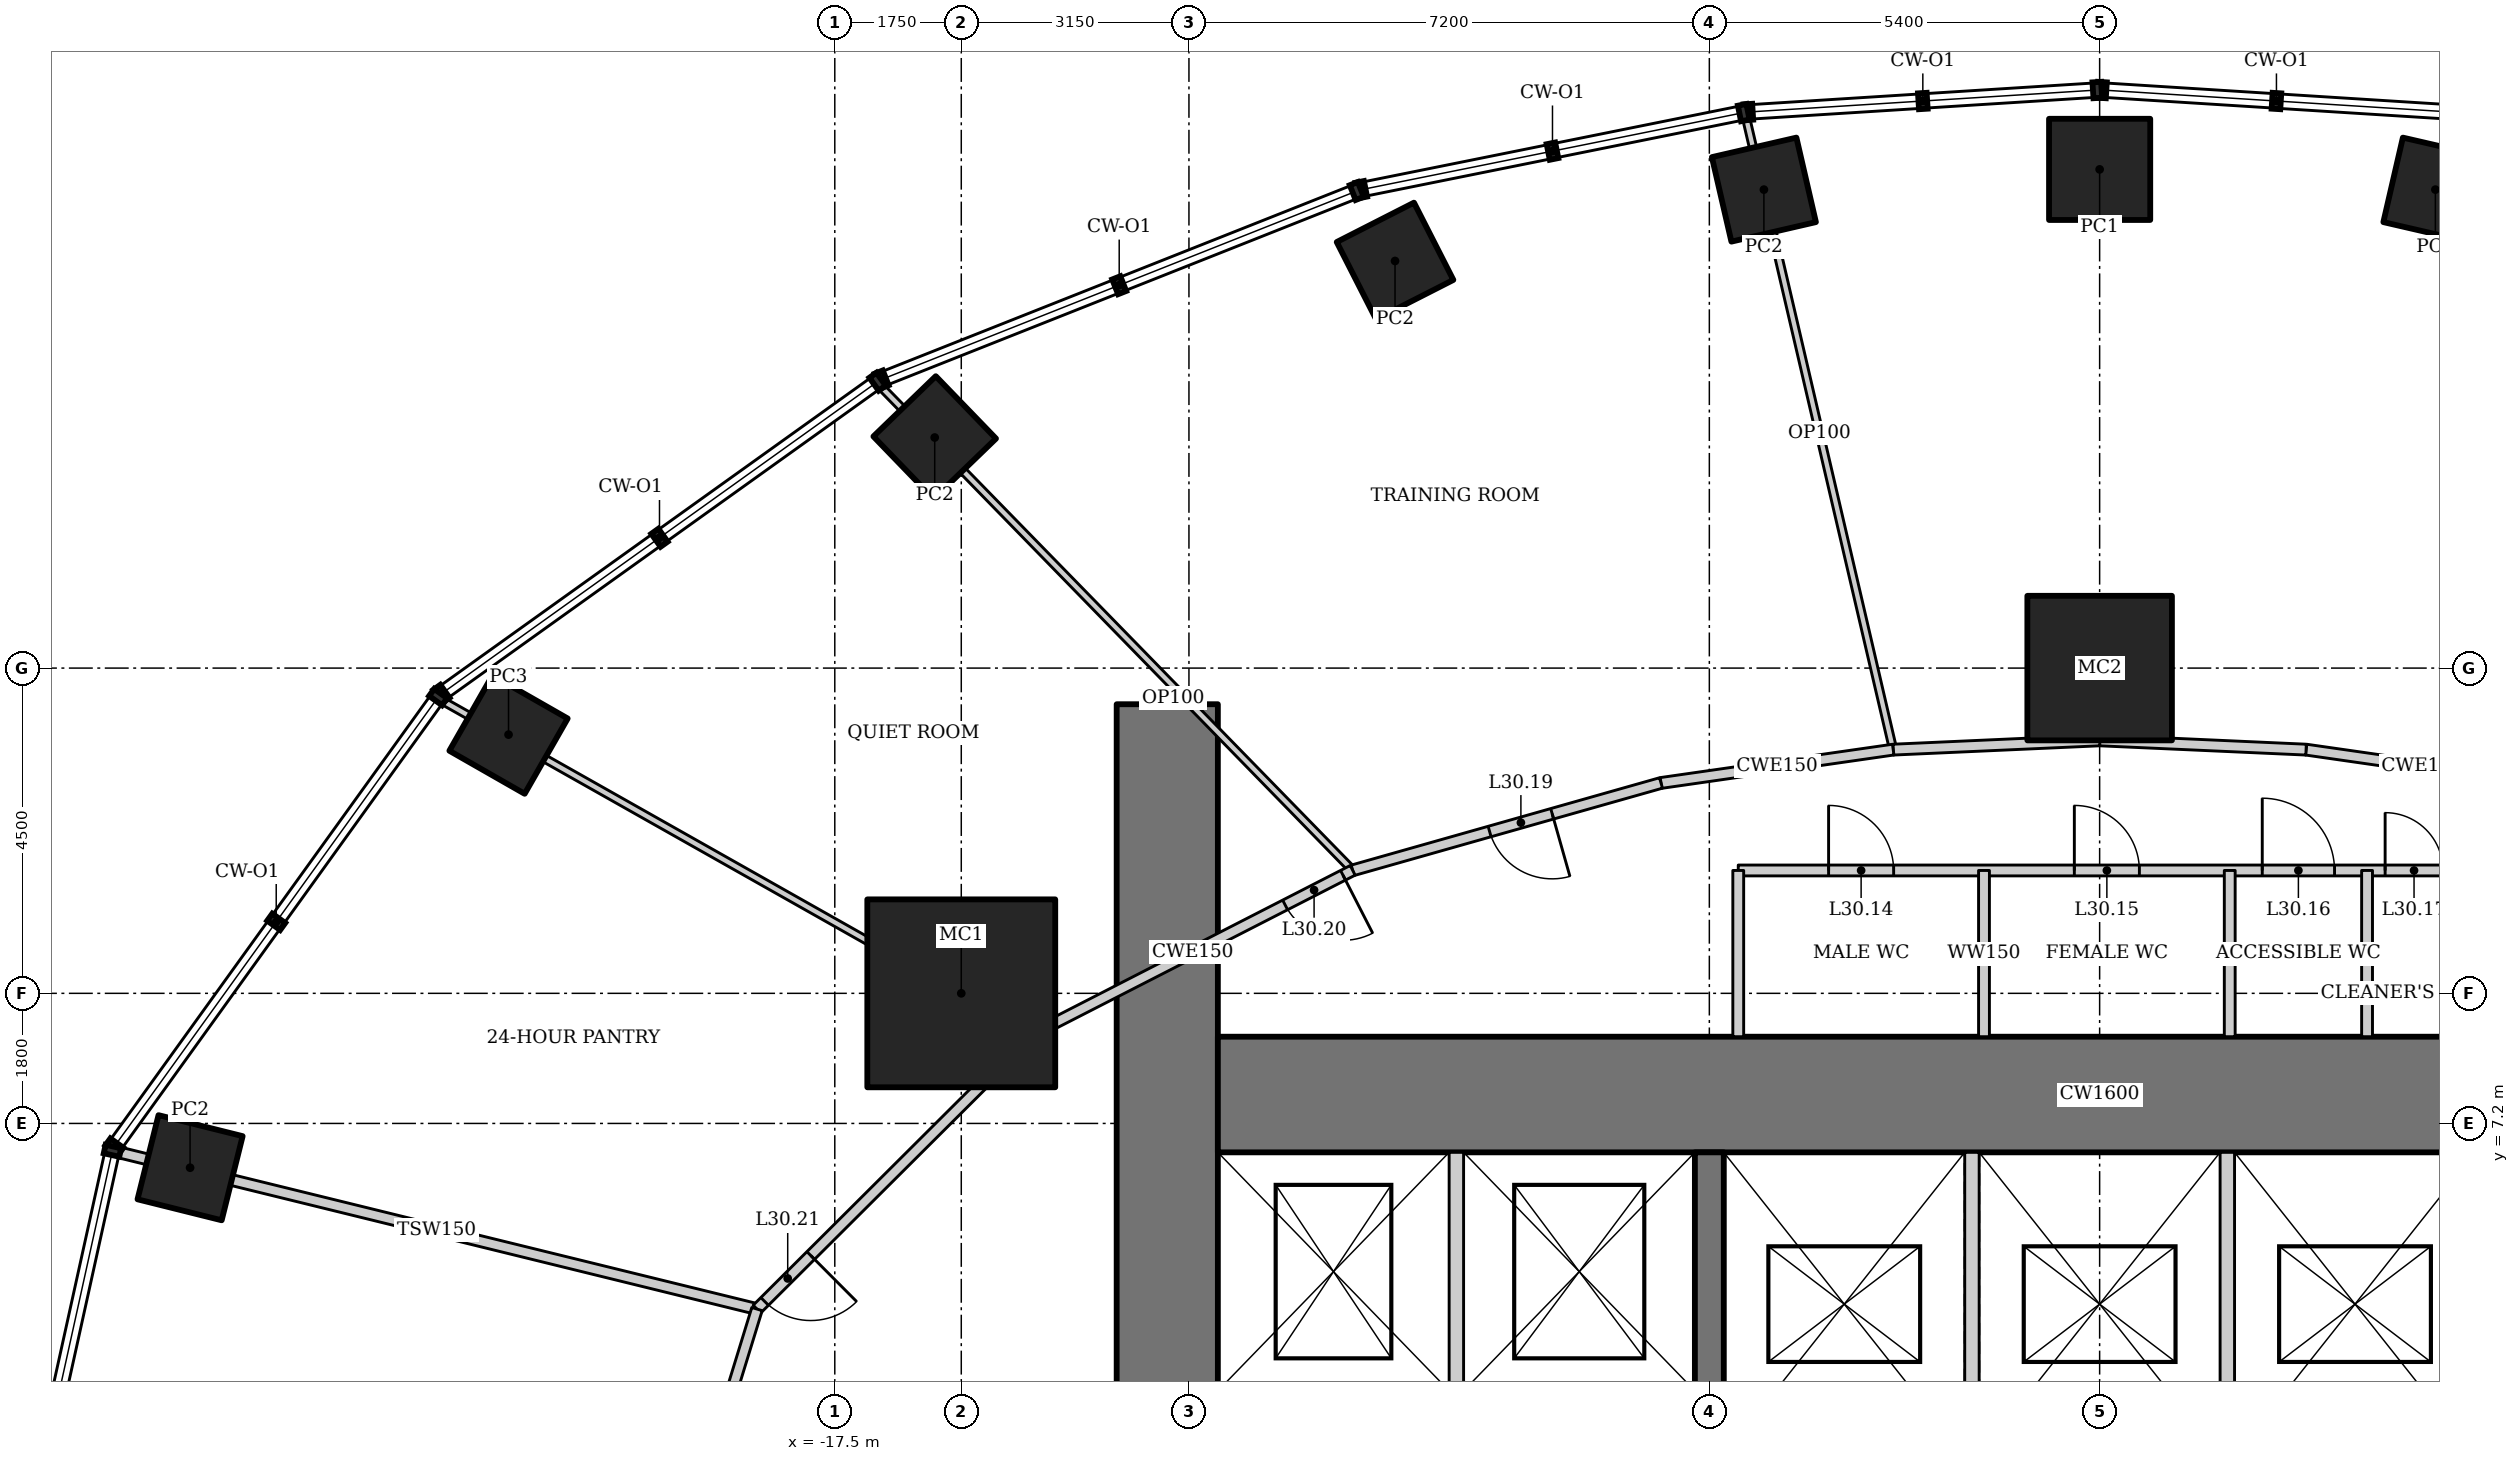
"""IFC4 building model, lengths in metres.
Left out: names, types, materials, properties, quantities, classifications, styles, units other than length and angle.
Written with IfcOpenShell. Run it as: python <this file> out.ifc"""

import sys

from ifc_helpers import new_model, si_unit, direction, frame, frame_2d, origin, origin_2d, place, context, subcontext, project, spatial, rectangle, hollow_rectangle, extrude, element, fill, save


model = new_model("IFC4")
c1 = context("Model", 3, precision=1e-05, world=origin(), true_north=direction((0.0, 1.0)))
c2 = subcontext(c1, "Body", "Model", "MODEL_VIEW")
j1 = project(units=[si_unit("LENGTHUNIT", "METRE"), si_unit("PLANEANGLEUNIT", "RADIAN")], contexts=[c1])
p1 = place(None, origin())
s1 = spatial("IfcSite", under=j1, at=p1, CompositionType="ELEMENT")
p2 = place(p1, origin())
s2 = spatial("IfcBuilding", under=s1, at=p2, CompositionType="ELEMENT")
p3 = place(p2, frame((0.0, 0.0, 130.0)))
s3 = spatial("IfcBuildingStorey", under=s2, at=p3, CompositionType="ELEMENT", Elevation=130.0)
p4 = place(p3, frame((0.0, 13.5, 0.0), z_axis=(0.0, 0.0, 1.0), x_axis=(1.0, 0.0, 0.0)))
e1 = element("IfcColumn", 1, at=p4, inside=s3, PredefinedType="COLUMN", context=c2, shape_type="SweptSolid", body=[
    extrude(hollow_rectangle(XDim=2.0, YDim=2.0, WallThickness=0.17, at=origin_2d()), origin(), (0.0, 0.0, 1.0), 4.2),
])
p5 = place(p3, frame((-15.75, 9.0, 0.0), z_axis=(0.0, 0.0, 1.0), x_axis=(1.0, 0.0, 0.0)))
e2 = element("IfcColumn", 2, at=p5, inside=s3, PredefinedType="COLUMN", context=c2, shape_type="SweptSolid", body=[
    extrude(hollow_rectangle(XDim=2.6, YDim=2.6, WallThickness=0.13, at=origin_2d()), origin(), (0.0, 0.0, 1.0), 4.2),
])
p6 = place(p3, frame((4.645, 20.12, 0.0), z_axis=(0.0, 0.0, 1.0), x_axis=(0.224951054344, 0.974370064785, 0.0)))
e3 = element("IfcColumn", 3, at=p6, inside=s3, PredefinedType="COLUMN", context=c2, shape_type="SweptSolid", body=[
    extrude(hollow_rectangle(XDim=1.2, YDim=1.2, WallThickness=0.1, at=origin_2d()), origin(), (0.0, 0.0, 1.0), 4.2),
])
p7 = place(p3, frame((0.0, 20.4, 0.0), z_axis=(0.0, 0.0, 1.0), x_axis=(1.0, 0.0, 0.0)))
e4 = element("IfcColumn", 4, at=p7, inside=s3, PredefinedType="COLUMN", context=c2, shape_type="SweptSolid", body=[
    extrude(hollow_rectangle(XDim=1.4, YDim=1.4, WallThickness=0.1, at=origin_2d()), origin(), (0.0, 0.0, 1.0), 4.2),
])
for number, where, z_axis, x_axis in (
    (5, (-4.645, 20.12, 0.0), (0.0, 0.0, 1.0), (0.974, 0.225, 0.0)),
    (6, (-9.749, 19.133, 0.0), (0.0, 0.0, 1.0), (0.891, 0.454, 0.0)),
    (7, (-16.118, 16.69, 0.0), (0.0, 0.0, 1.0), (0.719, 0.695, 0.0)),
):
    element("IfcColumn", number, at=place(p3, frame(where, z_axis=z_axis, x_axis=x_axis)), inside=s3, PredefinedType="COLUMN", context=c2, shape_type="SweptSolid", body=[
        extrude(hollow_rectangle(XDim=1.2, YDim=1.2, WallThickness=0.1, at=origin_2d()), origin(), (0.0, 0.0, 1.0), 4.2),
    ])
p8 = place(p3, frame((-22.014, 12.579, 0.0), z_axis=(0.0, 0.0, 1.0), x_axis=(0.496139221777, 0.86824298017, 0.0)))
e8 = element("IfcColumn", 8, at=p8, inside=s3, PredefinedType="COLUMN", context=c2, shape_type="SweptSolid", body=[
    extrude(hollow_rectangle(XDim=1.2, YDim=1.2, WallThickness=0.12, at=origin_2d()), origin(), (0.0, 0.0, 1.0), 4.2),
])
p9 = place(p3, frame((-26.42, 6.587, 0.0), z_axis=(0.0, 0.0, 1.0), x_axis=(0.2419218956, 0.970295726276, 0.0)))
e9 = element("IfcColumn", 9, at=p9, inside=s3, PredefinedType="COLUMN", context=c2, shape_type="SweptSolid", body=[
    extrude(hollow_rectangle(XDim=1.2, YDim=1.2, WallThickness=0.1, at=origin_2d()), origin(), (0.0, 0.0, 1.0), 4.2),
])
p10 = place(p3, frame((-12.9, 13.0, 0.0), z_axis=(0.0, 0.0, 1.0), x_axis=(0.0, -1.0, 0.0)))
e10 = element("IfcWall", 10, at=p10, inside=s3, PredefinedType="SHEAR", context=c2, shape_type="SweptSolid", body=[
    extrude(rectangle(XDim=26.0, YDim=1.4, at=frame_2d((13.0, 0.0))), origin(), (0.0, 0.0, 1.0), 4.2),
])
p11 = place(p10, frame((12.1, 0.0, 0.0)))
e11 = element("IfcOpeningElement", 11, at=p11, cuts=e10, PredefinedType="OPENING", context=c2, shape_type="SweptSolid", body=[
    extrude(rectangle(XDim=1.8, YDim=2.1, at=frame_2d((0.9, 1.05))), frame((0.0, 0.71, 0.0), z_axis=(0.0, -1.0, 0.0), x_axis=(1.0, 0.0, 0.0)), (0.0, 0.0, 1.0), 1.42),
])
p12 = place(p3, frame((12.2, 7.6, 0.0), z_axis=(0.0, 0.0, 1.0), x_axis=(-1.0, 0.0, 0.0)))
e12 = element("IfcWall", 12, at=p12, inside=s3, PredefinedType="SHEAR", context=c2, shape_type="SweptSolid", body=[
    extrude(rectangle(XDim=24.4, YDim=1.6, at=frame_2d((12.2, 0.0))), origin(), (0.0, 0.0, 1.0), 4.2),
])
p13 = place(p3, frame((-5.4, 6.8, 0.0), z_axis=(0.0, 0.0, 1.0), x_axis=(0.0, -1.0, 0.0)))
e13 = element("IfcWall", 13, at=p13, inside=s3, PredefinedType="SHEAR", context=c2, shape_type="SweptSolid", body=[
    extrude(rectangle(XDim=13.6, YDim=0.4, at=frame_2d((6.8, 0.0))), origin(), (0.0, 0.0, 1.0), 4.2),
])
p14 = place(p13, frame((5.9, 0.0, 0.0)))
e14 = element("IfcOpeningElement", 14, at=p14, cuts=e13, PredefinedType="OPENING", context=c2, shape_type="SweptSolid", body=[
    extrude(rectangle(XDim=1.8, YDim=2.1, at=frame_2d((0.9, 1.05))), frame((0.0, 0.21, 0.0), z_axis=(0.0, -1.0, 0.0), x_axis=(1.0, 0.0, 0.0)), (0.0, 0.0, 1.0), 0.42),
])
for number, where, z_axis, x_axis in (
    (15, (-1.767, 2.6, 0.0), (0.0, 0.0, 1.0), (0.0, 1.0, 0.0)),
    (16, (1.767, 2.6, 0.0), (0.0, 0.0, 1.0), (0.0, 1.0, 0.0)),
):
    element("IfcWall", number, at=place(p3, frame(where, z_axis=z_axis, x_axis=x_axis)), inside=s3, PredefinedType="SOLIDWALL", context=c2, shape_type="SweptSolid", body=[
        extrude(rectangle(XDim=4.2, YDim=0.2, at=frame_2d((2.1, 0.0))), origin(), (0.0, 0.0, 1.0), 4.2),
    ])
p15 = place(p3, frame((-8.9, 3.5, 0.0), z_axis=(0.0, 0.0, 1.0), x_axis=(0.0, 1.0, 0.0)))
e17 = element("IfcWall", 17, at=p15, inside=s3, PredefinedType="SOLIDWALL", context=c2, shape_type="SweptSolid", body=[
    extrude(rectangle(XDim=3.3, YDim=0.2, at=frame_2d((1.65, 0.0))), origin(), (0.0, 0.0, 1.0), 4.2),
])
p16 = place(p3, frame((-4.897, 21.135, 0.0), z_axis=(0.0, 0.0, 1.0), x_axis=(0.226817002645, -0.973937393938, 0.0)))
e18 = element("IfcWall", 18, at=p16, inside=s3, PredefinedType="PARTITIONING", context=c2, shape_type="SweptSolid", body=[
    extrude(rectangle(XDim=8.997, YDim=0.1, at=frame_2d((4.499, 0.0))), origin(), (0.0, 0.0, 1.0), 3.293),
])
p17 = place(p3, frame((-16.882, 17.414, 0.0), z_axis=(0.0, 0.0, 1.0), x_axis=(0.698290989425, -0.715814008027, 0.0)))
e19 = element("IfcWall", 19, at=p17, inside=s3, PredefinedType="PARTITIONING", context=c2, shape_type="SweptSolid", body=[
    extrude(rectangle(XDim=9.377, YDim=0.1, at=frame_2d((4.688, 0.0))), origin(), (0.0, 0.0, 1.0), 3.321),
])
p18 = place(p3, frame((-22.949, 13.059, 0.0), z_axis=(0.0, 0.0, 1.0), x_axis=(0.870733950517, -0.491754397456, 0.0)))
e20 = element("IfcWall", 20, at=p18, inside=s3, PredefinedType="PARTITIONING", context=c2, shape_type="SweptSolid", body=[
    extrude(rectangle(XDim=9.404, YDim=0.1, at=frame_2d((4.702, 0.0))), origin(), (0.0, 0.0, 1.0), 3.45),
])
p19 = place(p3, frame((-27.441, 6.809, 0.0), z_axis=(0.0, 0.0, 1.0), x_axis=(0.971128704348, -0.238556156056, 0.0)))
e21 = element("IfcWall", 21, at=p19, inside=s3, PredefinedType="PARTITIONING", context=c2, shape_type="SweptSolid", body=[
    extrude(rectangle(XDim=9.128, YDim=0.15, at=frame_2d((4.564, 0.0))), origin(), (0.0, 0.0, 1.0), 3.113),
])
p20 = place(p3, frame((6.069, 11.911, 0.0), z_axis=(0.0, 0.0, 1.0), x_axis=(-0.989852979412, 0.14209531713, 0.0)))
e22 = element("IfcWall", 22, at=p20, inside=s3, PredefinedType="PARTITIONING", context=c2, shape_type="SweptSolid", body=[
    extrude(rectangle(XDim=3.246, YDim=0.15, at=frame_2d((1.623, 0.0))), origin(), (0.0, 0.0, 1.0), 4.05),
])
for number, where, z_axis, x_axis in (
    (23, (2.856, 12.372, 0.0), (0.0, 0.0, 1.0), (-0.999, 0.045, 0.0)),
    (24, (0.0, 12.5, 0.0), (0.0, 0.0, 1.0), (-0.999, -0.045, 0.0)),
):
    element("IfcWall", number, at=place(p3, frame(where, z_axis=z_axis, x_axis=x_axis)), inside=s3, PredefinedType="PARTITIONING", context=c2, shape_type="SweptSolid", body=[
        extrude(rectangle(XDim=2.859, YDim=0.15, at=frame_2d((1.43, 0.0))), origin(), (0.0, 0.0, 1.0), 4.05),
    ])
p21 = place(p3, frame((-2.856, 12.372, 0.0), z_axis=(0.0, 0.0, 1.0), x_axis=(-0.989852979412, -0.14209531713, 0.0)))
e25 = element("IfcWall", 25, at=p21, inside=s3, PredefinedType="PARTITIONING", context=c2, shape_type="SweptSolid", body=[
    extrude(rectangle(XDim=3.246, YDim=0.15, at=frame_2d((1.623, 0.0))), origin(), (0.0, 0.0, 1.0), 4.05),
])
p22 = place(p3, frame((-6.069, 11.911, 0.0), z_axis=(0.0, 0.0, 1.0), x_axis=(-0.962122152905, -0.272618713388, 0.0)))
e26 = element("IfcWall", 26, at=p22, inside=s3, PredefinedType="PARTITIONING", context=c2, shape_type="SweptSolid", body=[
    extrude(rectangle(XDim=4.434, YDim=0.15, at=frame_2d((2.217, 0.0))), origin(), (0.0, 0.0, 1.0), 4.05),
])
p23 = place(p22, frame((1.565, 0.0, 0.0)))
e27 = element("IfcOpeningElement", 27, at=p23, cuts=e26, PredefinedType="OPENING", context=c2, shape_type="SweptSolid", body=[
    extrude(rectangle(XDim=0.9, YDim=2.1, at=frame_2d((0.45, 1.05))), frame((0.0, 0.085, 0.0), z_axis=(0.0, -1.0, 0.0), x_axis=(1.0, 0.0, 0.0)), (0.0, 0.0, 1.0), 0.17),
])
p24 = place(p3, frame((-10.335, 10.702, 0.0), z_axis=(0.0, 0.0, 1.0), x_axis=(-0.890004978294, -0.455950807227, 0.0)))
e28 = element("IfcWall", 28, at=p24, inside=s3, PredefinedType="PARTITIONING", context=c2, shape_type="SweptSolid", body=[
    extrude(rectangle(XDim=4.973, YDim=0.15, at=frame_2d((2.486, 0.0))), origin(), (0.0, 0.0, 1.0), 4.05),
])
p25 = place(p24, frame((0.15, 0.0, 0.0)))
e29 = element("IfcOpeningElement", 29, at=p25, cuts=e28, PredefinedType="OPENING", context=c2, shape_type="SweptSolid", body=[
    extrude(rectangle(XDim=0.9, YDim=2.1, at=frame_2d((0.45, 1.05))), frame((0.0, 0.085, 0.0), z_axis=(0.0, -1.0, 0.0), x_axis=(1.0, 0.0, 0.0)), (0.0, 0.0, 1.0), 0.17),
])
p26 = place(p3, frame((-14.76, 8.435, 0.0), z_axis=(0.0, 0.0, 1.0), x_axis=(-0.708306665233, -0.705904857603, 0.0)))
e30 = element("IfcWall", 30, at=p26, inside=s3, PredefinedType="PARTITIONING", context=c2, shape_type="SweptSolid", body=[
    extrude(rectangle(XDim=5.387, YDim=0.15, at=frame_2d((2.694, 0.0))), origin(), (0.0, 0.0, 1.0), 4.05),
])
p27 = place(p26, frame((4.337, 0.0, 0.0)))
e31 = element("IfcOpeningElement", 31, at=p27, cuts=e30, PredefinedType="OPENING", context=c2, shape_type="SweptSolid", body=[
    extrude(rectangle(XDim=0.9, YDim=2.1, at=frame_2d((0.45, 1.05))), frame((0.0, 0.085, 0.0), z_axis=(0.0, -1.0, 0.0), x_axis=(1.0, 0.0, 0.0)), (0.0, 0.0, 1.0), 0.17),
])
p28 = place(p3, frame((-18.576, 4.632, 0.0), z_axis=(0.0, 0.0, 1.0), x_axis=(-0.293799045613, -0.955867208767, 0.0)))
e32 = element("IfcWall", 32, at=p28, inside=s3, PredefinedType="PARTITIONING", context=c2, shape_type="SweptSolid", body=[
    extrude(rectangle(XDim=4.845, YDim=0.15, at=frame_2d((2.423, 0.0))), origin(), (0.0, 0.0, 1.0), 4.05),
])
p29 = place(p3, frame((-5.0, 10.7, 0.0), z_axis=(0.0, 0.0, 1.0), x_axis=(1.0, 0.0, 0.0)))
e33 = element("IfcWall", 33, at=p29, inside=s3, PredefinedType="SOLIDWALL", context=c2, shape_type="SweptSolid", body=[
    extrude(rectangle(XDim=10.0, YDim=0.15, at=frame_2d((5.0, 0.0))), origin(), (0.0, 0.0, 1.0), 4.05),
])
p30 = place(p29, frame((1.25, 0.0, 0.0)))
e34 = element("IfcOpeningElement", 34, at=p30, cuts=e33, PredefinedType="OPENING", context=c2, shape_type="SweptSolid", body=[
    extrude(rectangle(XDim=0.9, YDim=2.1, at=frame_2d((0.45, 1.05))), frame((0.0, 0.085, 0.0), z_axis=(0.0, -1.0, 0.0), x_axis=(1.0, 0.0, 0.0)), (0.0, 0.0, 1.0), 0.17),
])
p31 = place(p29, frame((4.65, 0.0, 0.0)))
e35 = element("IfcOpeningElement", 35, at=p31, cuts=e33, PredefinedType="OPENING", context=c2, shape_type="SweptSolid", body=[
    extrude(rectangle(XDim=0.9, YDim=2.1, at=frame_2d((0.45, 1.05))), frame((0.0, 0.085, 0.0), z_axis=(0.0, -1.0, 0.0), x_axis=(1.0, 0.0, 0.0)), (0.0, 0.0, 1.0), 0.17),
])
p32 = place(p29, frame((7.25, 0.0, 0.0)))
e36 = element("IfcOpeningElement", 36, at=p32, cuts=e33, PredefinedType="OPENING", context=c2, shape_type="SweptSolid", body=[
    extrude(rectangle(XDim=1.0, YDim=2.1, at=frame_2d((0.5, 1.05))), frame((0.0, 0.085, 0.0), z_axis=(0.0, -1.0, 0.0), x_axis=(1.0, 0.0, 0.0)), (0.0, 0.0, 1.0), 0.17),
])
p33 = place(p29, frame((8.95, 0.0, 0.0)))
e37 = element("IfcOpeningElement", 37, at=p33, cuts=e33, PredefinedType="OPENING", context=c2, shape_type="SweptSolid", body=[
    extrude(rectangle(XDim=0.8, YDim=2.1, at=frame_2d((0.4, 1.05))), frame((0.0, 0.085, 0.0), z_axis=(0.0, -1.0, 0.0), x_axis=(1.0, 0.0, 0.0)), (0.0, 0.0, 1.0), 0.17),
])
for number, where, z_axis, x_axis in (
    (38, (-5.0, 8.4, 0.0), (0.0, 0.0, 1.0), (0.0, 1.0, 0.0)),
    (39, (-1.6, 8.4, 0.0), (0.0, 0.0, 1.0), (0.0, 1.0, 0.0)),
    (40, (1.8, 8.4, 0.0), (0.0, 0.0, 1.0), (0.0, 1.0, 0.0)),
    (41, (3.7, 8.4, 0.0), (0.0, 0.0, 1.0), (0.0, 1.0, 0.0)),
):
    element("IfcWall", number, at=place(p3, frame(where, z_axis=z_axis, x_axis=x_axis)), inside=s3, PredefinedType="SOLIDWALL", context=c2, shape_type="SweptSolid", body=[
        extrude(rectangle(XDim=2.3, YDim=0.15, at=frame_2d((1.15, 0.0))), origin(), (0.0, 0.0, 1.0), 4.05),
    ])
p34 = place(p3, frame((-12.9, 13.0, 0.0), z_axis=(0.0, 0.0, 1.0), x_axis=(0.716013316663, 0.698086620959, 0.0)))
e42 = element("IfcWall", 42, at=p34, inside=s3, PredefinedType="PARTITIONING", context=c2, shape_type="SweptSolid", body=[
    extrude(rectangle(XDim=0.231, YDim=0.1, at=frame_2d((0.116, 0.0))), origin(), (0.0, 0.0, 1.0), 4.05),
])
p35 = place(p30, origin())
e43 = element("IfcDoor", 43, at=p35, inside=s3, OperationType="SINGLE_SWING_LEFT", PredefinedType="DOOR", context=c2, shape_type="SweptSolid", body=[
    extrude(rectangle(XDim=0.9, YDim=2.1, at=frame_2d((0.45, 1.05))), frame((0.0, 0.025, 0.0), z_axis=(0.0, -1.0, 0.0), x_axis=(1.0, 0.0, 0.0)), (0.0, 0.0, 1.0), 0.05),
])
fill(e34, e43)
p36 = place(p31, origin())
e44 = element("IfcDoor", 44, at=p36, inside=s3, OperationType="SINGLE_SWING_LEFT", PredefinedType="DOOR", context=c2, shape_type="SweptSolid", body=[
    extrude(rectangle(XDim=0.9, YDim=2.1, at=frame_2d((0.45, 1.05))), frame((0.0, 0.025, 0.0), z_axis=(0.0, -1.0, 0.0), x_axis=(1.0, 0.0, 0.0)), (0.0, 0.0, 1.0), 0.05),
])
fill(e35, e44)
p37 = place(p32, origin())
e45 = element("IfcDoor", 45, at=p37, inside=s3, OperationType="SINGLE_SWING_LEFT", PredefinedType="DOOR", context=c2, shape_type="SweptSolid", body=[
    extrude(rectangle(XDim=1.0, YDim=2.1, at=frame_2d((0.5, 1.05))), frame((0.0, 0.025, 0.0), z_axis=(0.0, -1.0, 0.0), x_axis=(1.0, 0.0, 0.0)), (0.0, 0.0, 1.0), 0.05),
])
fill(e36, e45)
p38 = place(p33, origin())
e46 = element("IfcDoor", 46, at=p38, inside=s3, OperationType="SINGLE_SWING_LEFT", PredefinedType="DOOR", context=c2, shape_type="SweptSolid", body=[
    extrude(rectangle(XDim=0.8, YDim=2.1, at=frame_2d((0.4, 1.05))), frame((0.0, 0.025, 0.0), z_axis=(0.0, -1.0, 0.0), x_axis=(1.0, 0.0, 0.0)), (0.0, 0.0, 1.0), 0.05),
])
fill(e37, e46)
p39 = place(p23, origin())
e47 = element("IfcDoor", 47, at=p39, inside=s3, OperationType="SINGLE_SWING_LEFT", PredefinedType="DOOR", context=c2, shape_type="SweptSolid", body=[
    extrude(rectangle(XDim=0.9, YDim=2.1, at=frame_2d((0.45, 1.05))), frame((0.0, 0.025, 0.0), z_axis=(0.0, -1.0, 0.0), x_axis=(1.0, 0.0, 0.0)), (0.0, 0.0, 1.0), 0.05),
])
fill(e27, e47)
p40 = place(p25, origin())
e48 = element("IfcDoor", 48, at=p40, inside=s3, OperationType="SINGLE_SWING_LEFT", PredefinedType="DOOR", context=c2, shape_type="SweptSolid", body=[
    extrude(rectangle(XDim=0.9, YDim=2.1, at=frame_2d((0.45, 1.05))), frame((0.0, 0.025, 0.0), z_axis=(0.0, -1.0, 0.0), x_axis=(1.0, 0.0, 0.0)), (0.0, 0.0, 1.0), 0.05),
])
fill(e29, e48)
p41 = place(p27, origin())
e49 = element("IfcDoor", 49, at=p41, inside=s3, OperationType="SINGLE_SWING_LEFT", PredefinedType="DOOR", context=c2, shape_type="SweptSolid", body=[
    extrude(rectangle(XDim=0.9, YDim=2.1, at=frame_2d((0.45, 1.05))), frame((0.0, 0.025, 0.0), z_axis=(0.0, -1.0, 0.0), x_axis=(1.0, 0.0, 0.0)), (0.0, 0.0, 1.0), 0.05),
])
fill(e31, e49)
save(model, sys.argv[1])
